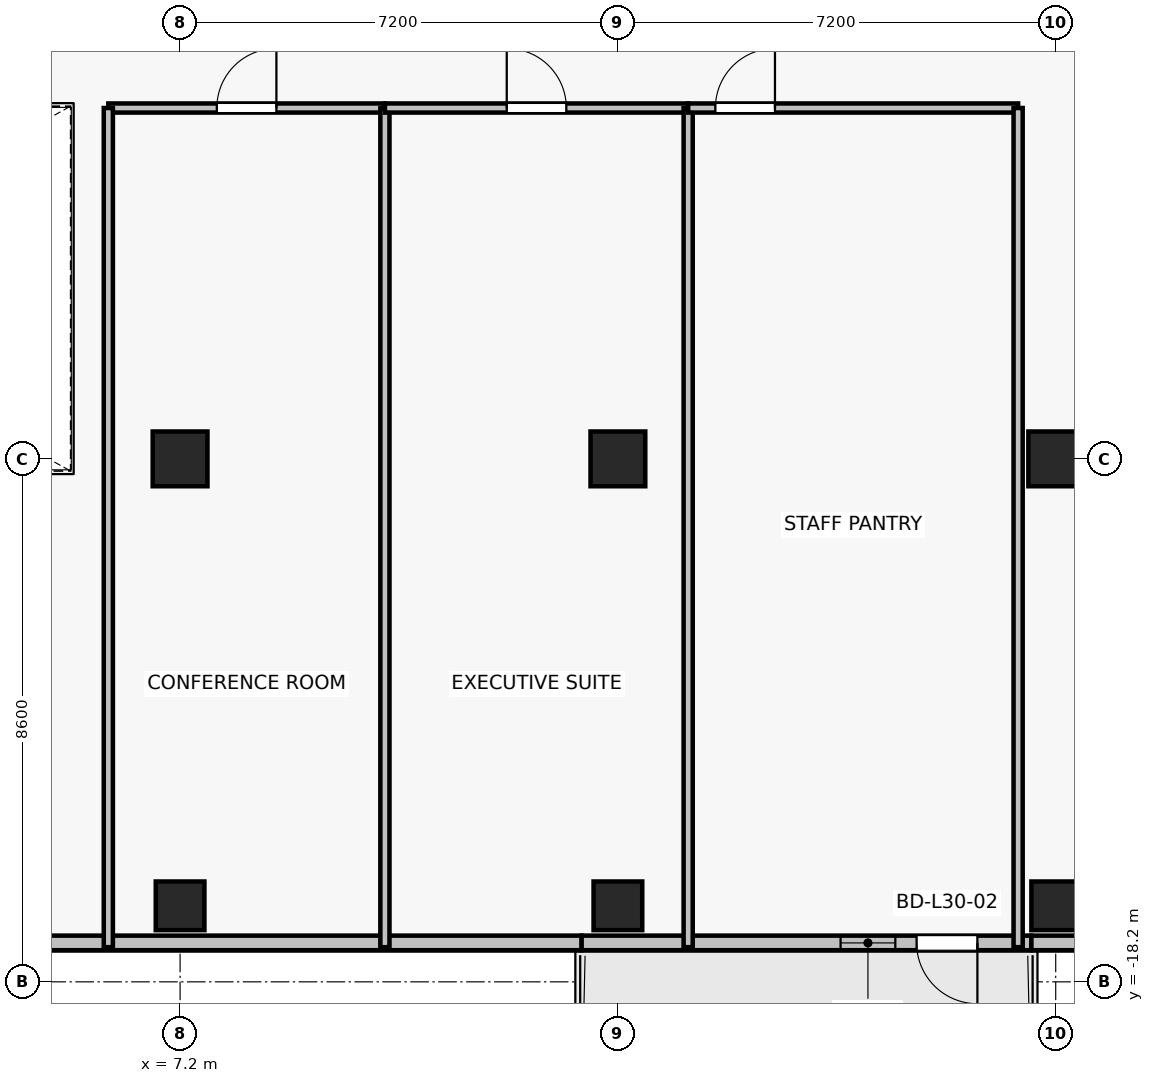
"""IFC4 building model, lengths in metres.
Left out: names, types, materials, properties, quantities, classifications, styles, units other than length and angle.
Written with IfcOpenShell. Run it as: python <this file> out.ifc"""

import sys

from ifc_helpers import new_model, si_unit, direction, frame, frame_2d, origin, origin_2d, place, context, subcontext, project, spatial, rectangle, extrude, source, transform, mapped, element, fill, save


model = new_model("IFC4")
c1 = context("Model", 3, precision=1e-05, world=origin(), true_north=direction((0.0, 1.0)))
c2 = subcontext(c1, "Body", "Model", "MODEL_VIEW")
j1 = project(units=[si_unit("LENGTHUNIT", "METRE"), si_unit("PLANEANGLEUNIT", "RADIAN")], contexts=[c1])
p1 = place(None, origin())
s1 = spatial("IfcSite", under=j1, at=p1, CompositionType="ELEMENT")
p2 = place(p1, origin())
s2 = spatial("IfcBuilding", under=s1, at=p2, CompositionType="ELEMENT")
p3 = place(p2, frame((0.0, 0.0, 109.9)))
s3 = spatial("IfcBuildingStorey", under=s2, at=p3, CompositionType="ELEMENT", Elevation=109.9)
for number, where, z_axis, x_axis in (
    (1, (7.2, -9.6, 0.0), (0.0, 0.0, 1.0), (1.0, 0.0, 0.0)),
    (2, (14.4, -9.6, 0.0), (0.0, 0.0, 1.0), (1.0, 0.0, 0.0)),
    (3, (21.6, -9.6, 0.0), (0.0, 0.0, 1.0), (1.0, 0.0, 0.0)),
):
    element("IfcColumn", number, at=place(p3, frame(where, z_axis=z_axis, x_axis=x_axis)), inside=s3, PredefinedType="COLUMN", context=c2, shape_type="SweptSolid", body=[
        extrude(rectangle(XDim=0.9, YDim=0.9, at=origin_2d()), origin(), (0.0, 0.0, 1.0), 3.3),
    ])
for number, where, z_axis, x_axis in (
    (4, (7.2, -16.95, 0.0), (0.0, 0.0, 1.0), (1.0, 0.0, 0.0)),
    (5, (14.4, -16.95, 0.0), (0.0, 0.0, 1.0), (1.0, 0.0, 0.0)),
    (6, (21.6, -16.95, 0.0), (0.0, 0.0, 1.0), (1.0, 0.0, 0.0)),
):
    element("IfcColumn", number, at=place(p3, frame(where, z_axis=z_axis, x_axis=x_axis)), inside=s3, PredefinedType="COLUMN", context=c2, shape_type="SweptSolid", body=[
        extrude(rectangle(XDim=0.8, YDim=0.8, at=origin_2d()), origin(), (0.0, 0.0, 1.0), 3.3),
    ])
p4 = place(p3, frame((21.2, -17.56, 0.0), z_axis=(0.0, 0.0, 1.0), x_axis=(-1.0, 0.0, 0.0)))
e7 = element("IfcWall", 7, at=p4, inside=s3, PredefinedType="SOLIDWALL", context=c2, shape_type="SweptSolid", body=[
    extrude(rectangle(XDim=7.4, YDim=0.24, at=frame_2d((3.7, 0.0))), origin(), (0.0, 0.0, 1.0), 2.665),
])
p5 = place(p4, frame((0.888, 0.0, 0.0)))
e8 = element("IfcOpeningElement", 8, at=p5, cuts=e7, PredefinedType="OPENING", context=c2, shape_type="SweptSolid", body=[
    extrude(rectangle(XDim=1.0, YDim=2.2, at=frame_2d((0.5, 1.1))), frame((0.0, 0.13, 0.0), z_axis=(0.0, -1.0, 0.0), x_axis=(1.0, 0.0, 0.0)), (0.0, 0.0, 1.0), 0.26),
])
p6 = place(p4, frame((2.238, 0.0, 0.85)))
e9 = element("IfcOpeningElement", 9, at=p6, cuts=e7, PredefinedType="OPENING", context=c2, shape_type="SweptSolid", body=[
    extrude(rectangle(XDim=0.9, YDim=1.35, at=frame_2d((0.45, 0.675))), frame((0.0, 0.13, 0.0), z_axis=(0.0, -1.0, 0.0), x_axis=(1.0, 0.0, 0.0)), (0.0, 0.0, 1.0), 0.26),
])
p7 = place(p3, frame((21.2, -17.56, 0.0), z_axis=(0.0, 0.0, 1.0), x_axis=(1.0, 0.0, 0.0)))
e10 = element("IfcWall", 10, at=p7, inside=s3, PredefinedType="SOLIDWALL", context=c2, shape_type="SweptSolid", body=[
    extrude(rectangle(XDim=1.26, YDim=0.24, at=frame_2d((0.63, 0.0))), origin(), (0.0, 0.0, 1.0), 3.075),
])
p8 = place(p3, frame((3.34, -17.56, 0.0), z_axis=(0.0, 0.0, 1.0), x_axis=(1.0, 0.0, 0.0)))
e11 = element("IfcWall", 11, at=p8, inside=s3, PredefinedType="SOLIDWALL", context=c2, shape_type="SweptSolid", body=[
    extrude(rectangle(XDim=10.46, YDim=0.24, at=frame_2d((5.23, 0.0))), origin(), (0.0, 0.0, 1.0), 2.665),
])
p9 = place(p3, frame((6.02, -3.83, 0.0), z_axis=(0.0, 0.0, 1.0), x_axis=(1.0, 0.0, 0.0)))
e12 = element("IfcWall", 12, at=p9, inside=s3, PredefinedType="PARTITIONING", context=c2, shape_type="SweptSolid", body=[
    extrude(rectangle(XDim=4.548, YDim=0.15, at=frame_2d((2.274, 0.0))), origin(), (0.0, 0.0, 1.0), 2.515),
])
p10 = place(p9, frame((1.784, 0.0, 0.0)))
e13 = element("IfcOpeningElement", 13, at=p10, cuts=e12, PredefinedType="OPENING", context=c2, shape_type="SweptSolid", body=[
    extrude(rectangle(XDim=0.98, YDim=2.15, at=frame_2d((0.49, 1.075))), frame((0.0, 0.085, 0.0), z_axis=(0.0, -1.0, 0.0), x_axis=(1.0, 0.0, 0.0)), (0.0, 0.0, 1.0), 0.17),
])
for number, where, z_axis, x_axis in (
    (14, (6.02, -17.63, 0.0), (0.0, 0.0, 1.0), (0.0, 1.0, 0.0)),
    (15, (10.568, -3.83, 0.0), (0.0, 0.0, 1.0), (0.0, -1.0, 0.0)),
):
    element("IfcWall", number, at=place(p3, frame(where, z_axis=z_axis, x_axis=x_axis)), inside=s3, PredefinedType="PARTITIONING", context=c2, shape_type="SweptSolid", body=[
        extrude(rectangle(XDim=13.8, YDim=0.15, at=frame_2d((6.9, 0.0))), origin(), (0.0, 0.0, 1.0), 2.515),
    ])
p11 = place(p3, frame((10.568, -3.83, 0.0), z_axis=(0.0, 0.0, 1.0), x_axis=(1.0, 0.0, 0.0)))
e16 = element("IfcWall", 16, at=p11, inside=s3, PredefinedType="PARTITIONING", context=c2, shape_type="SweptSolid", body=[
    extrude(rectangle(XDim=4.987, YDim=0.15, at=frame_2d((2.494, 0.0))), origin(), (0.0, 0.0, 1.0), 2.515),
])
p12 = place(p11, frame((2.004, 0.0, 0.0)))
e17 = element("IfcOpeningElement", 17, at=p12, cuts=e16, PredefinedType="OPENING", context=c2, shape_type="SweptSolid", body=[
    extrude(rectangle(XDim=0.98, YDim=2.15, at=frame_2d((0.49, 1.075))), frame((0.0, 0.085, 0.0), z_axis=(0.0, -1.0, 0.0), x_axis=(1.0, 0.0, 0.0)), (0.0, 0.0, 1.0), 0.17),
])
p13 = place(p3, frame((15.556, -3.83, 0.0), z_axis=(0.0, 0.0, 1.0), x_axis=(0.0, -1.0, 0.0)))
e18 = element("IfcWall", 18, at=p13, inside=s3, PredefinedType="PARTITIONING", context=c2, shape_type="SweptSolid", body=[
    extrude(rectangle(XDim=13.8, YDim=0.15, at=frame_2d((6.9, 0.0))), origin(), (0.0, 0.0, 1.0), 2.515),
])
p14 = place(p3, frame((15.556, -3.83, 0.0), z_axis=(0.0, 0.0, 1.0), x_axis=(1.0, 0.0, 0.0)))
e19 = element("IfcWall", 19, at=p14, inside=s3, PredefinedType="PARTITIONING", context=c2, shape_type="SweptSolid", body=[
    extrude(rectangle(XDim=5.426, YDim=0.15, at=frame_2d((2.713, 0.0))), origin(), (0.0, 0.0, 1.0), 3.075),
])
p15 = place(p14, frame((0.448, 0.0, 0.0)))
e20 = element("IfcOpeningElement", 20, at=p15, cuts=e19, PredefinedType="OPENING", context=c2, shape_type="SweptSolid", body=[
    extrude(rectangle(XDim=0.98, YDim=2.15, at=frame_2d((0.49, 1.075))), frame((0.0, 0.085, 0.0), z_axis=(0.0, -1.0, 0.0), x_axis=(1.0, 0.0, 0.0)), (0.0, 0.0, 1.0), 0.17),
])
p16 = place(p3, frame((20.982, -3.83, 0.0), z_axis=(0.0, 0.0, 1.0), x_axis=(0.0, -1.0, 0.0)))
e21 = element("IfcWall", 21, at=p16, inside=s3, PredefinedType="PARTITIONING", context=c2, shape_type="SweptSolid", body=[
    extrude(rectangle(XDim=13.8, YDim=0.15, at=frame_2d((6.9, 0.0))), origin(), (0.0, 0.0, 1.0), 2.515),
])
m1 = source(origin(), c2, "Body", "SweptSolid", [
    extrude(rectangle(XDim=1.0, YDim=2.2, at=frame_2d((0.5, 1.1))), frame((0.0, 0.025, 0.0), z_axis=(0.0, -1.0, 0.0), x_axis=(1.0, 0.0, 0.0)), (0.0, 0.0, 1.0), 0.05),
])
p17 = place(p5, origin())
e22 = element("IfcDoor", 22, at=p17, inside=s3, OperationType="SINGLE_SWING_LEFT", PredefinedType="DOOR", context=c2, shape_type="MappedRepresentation", body=[
    mapped(m1, transform((0.0, 0.0, 0.0), x_axis=(1.0, 0.0, 0.0), y_axis=(0.0, 1.0, 0.0), z_axis=(0.0, 0.0, 1.0), scale=1.0)),
])
fill(e8, e22)
m2 = source(origin(), c2, "Body", "SweptSolid", [
    extrude(rectangle(XDim=0.9, YDim=1.35, at=frame_2d((0.45, 0.675))), frame((0.0, 0.03, 0.0), z_axis=(0.0, -1.0, 0.0), x_axis=(1.0, 0.0, 0.0)), (0.0, 0.0, 1.0), 0.06),
])
p18 = place(p6, origin())
e23 = element("IfcWindow", 23, at=p18, inside=s3, PartitioningType="SINGLE_PANEL", PredefinedType="WINDOW", context=c2, shape_type="MappedRepresentation", body=[
    mapped(m2, transform((0.0, 0.0, 0.0), x_axis=(1.0, 0.0, 0.0), y_axis=(0.0, 1.0, 0.0), z_axis=(0.0, 0.0, 1.0), scale=1.0)),
])
fill(e9, e23)
m3 = source(origin(), c2, "Body", "SweptSolid", [
    extrude(rectangle(XDim=0.98, YDim=2.15, at=frame_2d((0.49, 1.075))), frame((0.0, 0.025, 0.0), z_axis=(0.0, -1.0, 0.0), x_axis=(1.0, 0.0, 0.0)), (0.0, 0.0, 1.0), 0.05),
])
p19 = place(p10, origin())
e24 = element("IfcDoor", 24, at=p19, inside=s3, OperationType="SINGLE_SWING_RIGHT", PredefinedType="DOOR", context=c2, shape_type="MappedRepresentation", body=[
    mapped(m3, transform((0.0, 0.0, 0.0), x_axis=(1.0, 0.0, 0.0), y_axis=(0.0, 1.0, 0.0), z_axis=(0.0, 0.0, 1.0), scale=1.0)),
])
fill(e13, e24)
p20 = place(p12, origin())
e25 = element("IfcDoor", 25, at=p20, inside=s3, OperationType="SINGLE_SWING_LEFT", PredefinedType="DOOR", context=c2, shape_type="MappedRepresentation", body=[
    mapped(m3, transform((0.0, 0.0, 0.0), x_axis=(1.0, 0.0, 0.0), y_axis=(0.0, 1.0, 0.0), z_axis=(0.0, 0.0, 1.0), scale=1.0)),
])
fill(e17, e25)
p21 = place(p15, origin())
e26 = element("IfcDoor", 26, at=p21, inside=s3, OperationType="SINGLE_SWING_RIGHT", PredefinedType="DOOR", context=c2, shape_type="MappedRepresentation", body=[
    mapped(m3, transform((0.0, 0.0, 0.0), x_axis=(1.0, 0.0, 0.0), y_axis=(0.0, 1.0, 0.0), z_axis=(0.0, 0.0, 1.0), scale=1.0)),
])
fill(e20, e26)
save(model, sys.argv[1])
